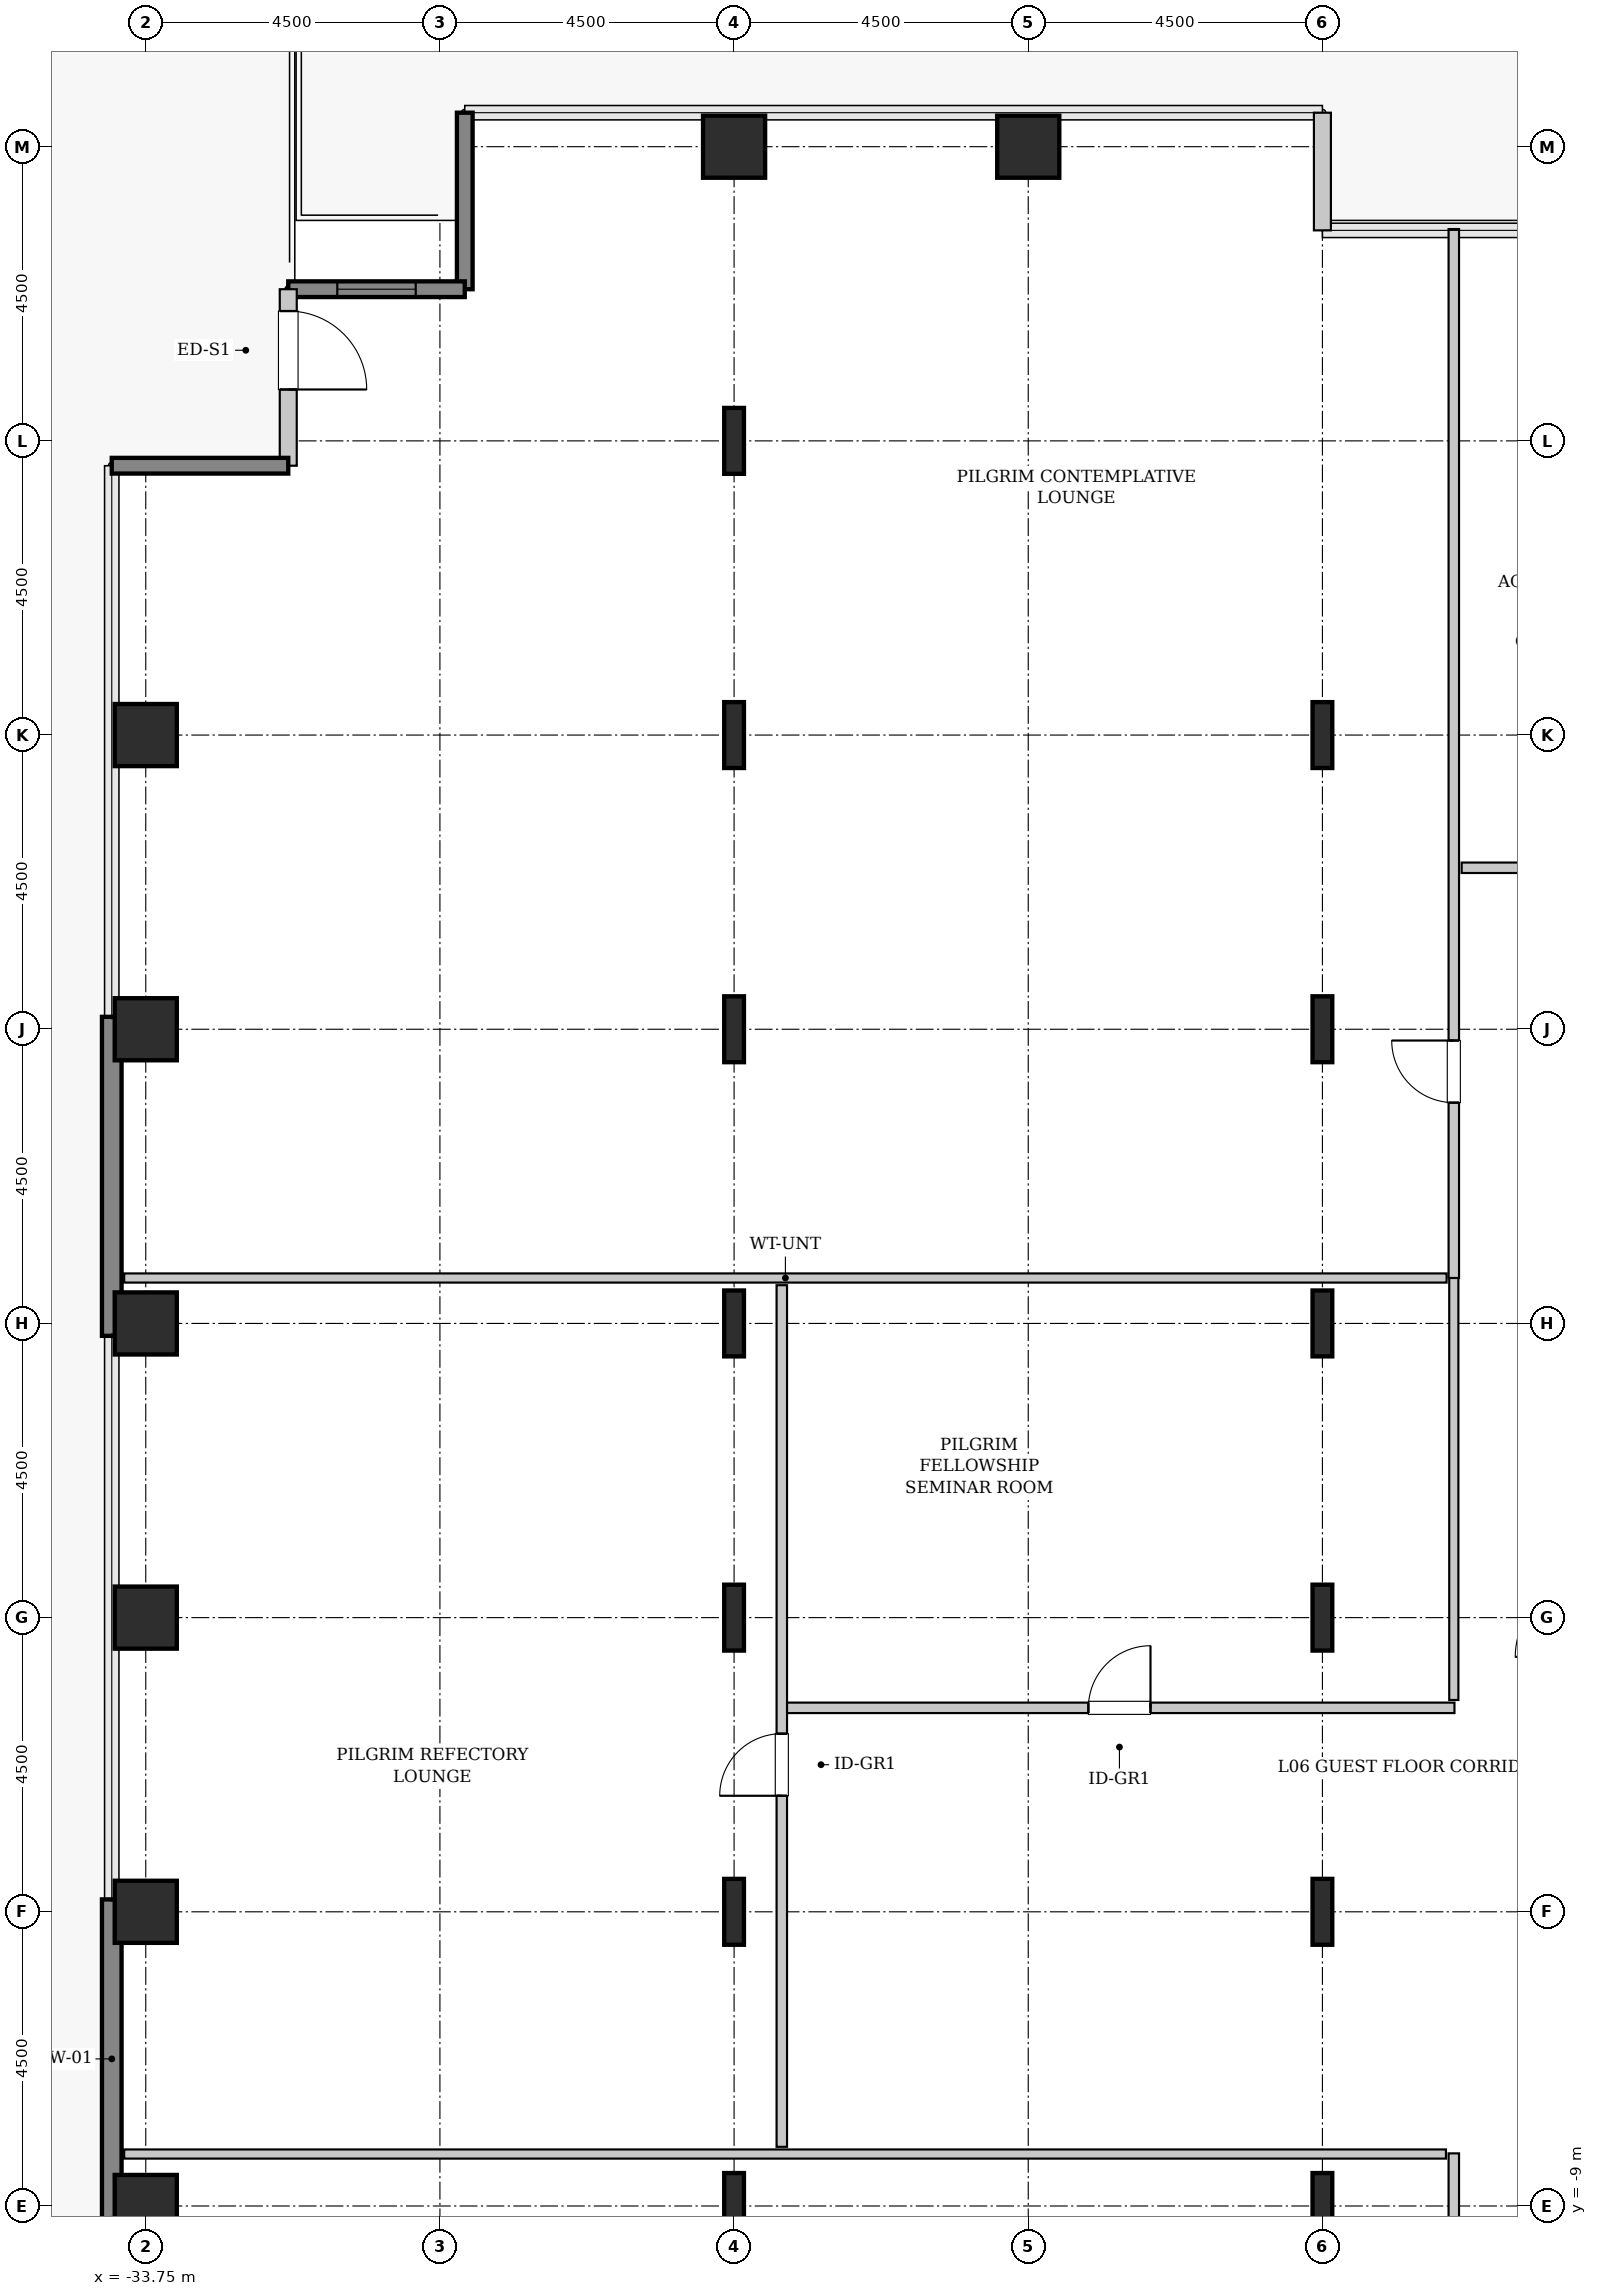
"""IFC4 building model, lengths in metres.
Left out: names, types, materials, properties, quantities, classifications, styles, units other than length and angle.
Written with IfcOpenShell. Run it as: python <this file> out.ifc"""

import sys

from ifc_helpers import new_model, si_unit, direction, frame, frame_2d, origin, origin_2d, place, context, subcontext, project, spatial, rectangle, hollow_rectangle, i_section, extrude, source, transform, mapped, element, fill, save


model = new_model("IFC4")
c1 = context("Model", 3, precision=1e-05, world=origin(), true_north=direction((0.0, 1.0)))
c2 = subcontext(c1, "Body", "Model", "MODEL_VIEW")
j1 = project(units=[si_unit("LENGTHUNIT", "METRE"), si_unit("PLANEANGLEUNIT", "RADIAN")], contexts=[c1])
p1 = place(None, origin())
s1 = spatial("IfcSite", under=j1, at=p1, CompositionType="ELEMENT")
p2 = place(p1, origin())
s2 = spatial("IfcBuilding", under=s1, at=p2, CompositionType="ELEMENT")
p3 = place(p2, frame((0.0, 0.0, 33.0)))
s3 = spatial("IfcBuildingStorey", under=s2, at=p3, CompositionType="ELEMENT", Elevation=33.0)
m1 = source(origin(), c2, "Body", "SweptSolid", [
    extrude(hollow_rectangle(XDim=0.95, YDim=0.95, WallThickness=0.045, InnerFilletRadius=0.045, OuterFilletRadius=0.09, at=origin_2d()), origin(), (0.0, 0.0, 1.0), 3.8),
])
for number, where, z_axis, x_axis in (
    (1, (-33.75, -9.0, 0.0), (0.0, 0.0, 1.0), (1.0, 0.0, 0.0)),
    (2, (-33.75, -4.5, 0.0), (0.0, 0.0, 1.0), (1.0, 0.0, 0.0)),
    (3, (-33.75, 0.0, 0.0), (0.0, 0.0, 1.0), (1.0, 0.0, 0.0)),
    (4, (-33.75, 4.5, 0.0), (0.0, 0.0, 1.0), (1.0, 0.0, 0.0)),
    (5, (-33.75, 9.0, 0.0), (0.0, 0.0, 1.0), (1.0, 0.0, 0.0)),
    (6, (-33.75, 13.5, 0.0), (0.0, 0.0, 1.0), (1.0, 0.0, 0.0)),
):
    element("IfcColumn", number, at=place(p3, frame(where, z_axis=z_axis, x_axis=x_axis)), inside=s3, PredefinedType="COLUMN", context=c2, shape_type="MappedRepresentation", body=[
        mapped(m1, transform((0.0, 0.0, 0.0), x_axis=(1.0, 0.0, 0.0), y_axis=(0.0, 1.0, 0.0), z_axis=(0.0, 0.0, 1.0), scale=1.0)),
    ])
m2 = source(origin(), c2, "Body", "SweptSolid", [
    extrude(i_section(OverallWidth=0.302, OverallDepth=1.008, WebThickness=0.021, FlangeThickness=0.04, FilletRadius=0.03, at=origin_2d()), origin(), (0.0, 0.0, 1.0), 3.8),
])
for number, where, z_axis, x_axis in (
    (7, (-24.75, -9.0, 0.0), (0.0, 0.0, 1.0), (1.0, 0.0, 0.0)),
    (8, (-24.75, -4.5, 0.0), (0.0, 0.0, 1.0), (1.0, 0.0, 0.0)),
    (9, (-24.75, 0.0, 0.0), (0.0, 0.0, 1.0), (1.0, 0.0, 0.0)),
    (10, (-24.75, 4.5, 0.0), (0.0, 0.0, 1.0), (1.0, 0.0, 0.0)),
    (11, (-24.75, 9.0, 0.0), (0.0, 0.0, 1.0), (1.0, 0.0, 0.0)),
    (12, (-24.75, 13.5, 0.0), (0.0, 0.0, 1.0), (1.0, 0.0, 0.0)),
    (13, (-24.75, 18.0, 0.0), (0.0, 0.0, 1.0), (1.0, 0.0, 0.0)),
):
    element("IfcColumn", number, at=place(p3, frame(where, z_axis=z_axis, x_axis=x_axis)), inside=s3, PredefinedType="COLUMN", context=c2, shape_type="MappedRepresentation", body=[
        mapped(m2, transform((0.0, 0.0, 0.0), x_axis=(1.0, 0.0, 0.0), y_axis=(0.0, 1.0, 0.0), z_axis=(0.0, 0.0, 1.0), scale=1.0)),
    ])
for number, where, z_axis, x_axis in (
    (14, (-24.75, 22.5, 0.0), (0.0, 0.0, 1.0), (1.0, 0.0, 0.0)),
    (15, (-20.25, 22.5, 0.0), (0.0, 0.0, 1.0), (1.0, 0.0, 0.0)),
):
    element("IfcColumn", number, at=place(p3, frame(where, z_axis=z_axis, x_axis=x_axis)), inside=s3, PredefinedType="COLUMN", context=c2, shape_type="MappedRepresentation", body=[
        mapped(m1, transform((0.0, 0.0, 0.0), x_axis=(1.0, 0.0, 0.0), y_axis=(0.0, 1.0, 0.0), z_axis=(0.0, 0.0, 1.0), scale=1.0)),
    ])
for number, where, z_axis, x_axis in (
    (16, (-15.75, -9.0, 0.0), (0.0, 0.0, 1.0), (1.0, 0.0, 0.0)),
    (17, (-15.75, -4.5, 0.0), (0.0, 0.0, 1.0), (1.0, 0.0, 0.0)),
    (18, (-15.75, 0.0, 0.0), (0.0, 0.0, 1.0), (1.0, 0.0, 0.0)),
    (19, (-15.75, 4.5, 0.0), (0.0, 0.0, 1.0), (1.0, 0.0, 0.0)),
    (20, (-15.75, 9.0, 0.0), (0.0, 0.0, 1.0), (1.0, 0.0, 0.0)),
    (21, (-15.75, 13.5, 0.0), (0.0, 0.0, 1.0), (1.0, 0.0, 0.0)),
):
    element("IfcColumn", number, at=place(p3, frame(where, z_axis=z_axis, x_axis=x_axis)), inside=s3, PredefinedType="COLUMN", context=c2, shape_type="MappedRepresentation", body=[
        mapped(m2, transform((0.0, 0.0, 0.0), x_axis=(1.0, 0.0, 0.0), y_axis=(0.0, 1.0, 0.0), z_axis=(0.0, 0.0, 1.0), scale=1.0)),
    ])
m3 = source(origin(), c2, "Body", "SweptSolid", [
    extrude(rectangle(XDim=4.88, YDim=0.3, at=frame_2d((2.44, 0.0))), origin(), (0.0, 0.0, 1.0), 3.55),
])
for number, where, z_axis, x_axis in (
    (22, (-34.27, -9.19, 0.0), (0.0, 0.0, 1.0), (0.0, 1.0, 0.0)),
    (23, (-34.27, 4.31, 0.0), (0.0, 0.0, 1.0), (0.0, 1.0, 0.0)),
):
    element("IfcWall", number, at=place(p3, frame(where, z_axis=z_axis, x_axis=x_axis)), inside=s3, PredefinedType="SHEAR", context=c2, shape_type="MappedRepresentation", body=[
        mapped(m3, transform((0.0, 0.0, 0.0), x_axis=(1.0, 0.0, 0.0), y_axis=(0.0, 1.0, 0.0), z_axis=(0.0, 0.0, 1.0), scale=1.0)),
    ])
m4 = source(origin(), c2, "Body", "SweptSolid", [
    extrude(rectangle(XDim=1.8, YDim=0.26, at=frame_2d((0.9, 0.0))), origin(), (0.0, 0.0, 1.0), 3.55),
])
p4 = place(p3, frame((-15.75, 21.22, 0.0), z_axis=(0.0, 0.0, 1.0), x_axis=(0.0, 1.0, 0.0)))
e24 = element("IfcWall", 24, at=p4, inside=s3, PredefinedType="SOLIDWALL", context=c2, shape_type="MappedRepresentation", body=[
    mapped(m4, transform((0.0, 0.0, 0.0), x_axis=(1.0, 0.0, 0.0), y_axis=(0.0, 1.0, 0.0), z_axis=(0.0, 0.0, 1.0), scale=1.0)),
])
m5 = source(origin(), c2, "Body", "SweptSolid", [
    extrude(rectangle(XDim=2.7, YDim=0.24, at=frame_2d((1.35, 0.0))), origin(), (0.0, 0.0, 1.0), 3.55),
])
p5 = place(p3, frame((-28.87, 23.02, 0.0), z_axis=(0.0, 0.0, 1.0), x_axis=(0.0, -1.0, 0.0)))
e25 = element("IfcWall", 25, at=p5, inside=s3, PredefinedType="SHEAR", context=c2, shape_type="MappedRepresentation", body=[
    mapped(m5, transform((0.0, 0.0, 0.0), x_axis=(1.0, 0.0, 0.0), y_axis=(0.0, 1.0, 0.0), z_axis=(0.0, 0.0, 1.0), scale=1.0)),
])
p6 = place(p3, frame((-28.87, 20.32, 0.0), z_axis=(0.0, 0.0, 1.0), x_axis=(-1.0, 0.0, 0.0)))
e26 = element("IfcWall", 26, at=p6, inside=s3, PredefinedType="SHEAR", context=c2, shape_type="MappedRepresentation", body=[
    mapped(m5, transform((0.0, 0.0, 0.0), x_axis=(1.0, 0.0, 0.0), y_axis=(0.0, 1.0, 0.0), z_axis=(0.0, 0.0, 1.0), scale=1.0)),
])
p7 = place(p6, frame((0.75, 0.0, 0.85)))
e27 = element("IfcOpeningElement", 27, at=p7, cuts=e26, PredefinedType="OPENING", context=c2, shape_type="SweptSolid", body=[
    extrude(rectangle(XDim=1.2, YDim=1.8, at=frame_2d((0.6, 0.9))), frame((0.0, 0.13, 0.0), z_axis=(0.0, -1.0, 0.0), x_axis=(1.0, 0.0, 0.0)), (0.0, 0.0, 1.0), 0.26),
])
m6 = source(origin(), c2, "Body", "SweptSolid", [
    extrude(rectangle(XDim=2.7, YDim=0.26, at=frame_2d((1.35, 0.0))), origin(), (0.0, 0.0, 1.0), 3.55),
])
p8 = place(p3, frame((-31.57, 20.32, 0.0), z_axis=(0.0, 0.0, 1.0), x_axis=(0.0, -1.0, 0.0)))
e28 = element("IfcWall", 28, at=p8, inside=s3, PredefinedType="SOLIDWALL", context=c2, shape_type="MappedRepresentation", body=[
    mapped(m6, transform((0.0, 0.0, 0.0), x_axis=(1.0, 0.0, 0.0), y_axis=(0.0, 1.0, 0.0), z_axis=(0.0, 0.0, 1.0), scale=1.0)),
])
p9 = place(p8, frame((0.334, 0.0, 0.0)))
e29 = element("IfcOpeningElement", 29, at=p9, cuts=e28, PredefinedType="OPENING", context=c2, shape_type="SweptSolid", body=[
    extrude(rectangle(XDim=1.2, YDim=2.2, at=frame_2d((0.6, 1.1))), frame((0.0, 0.14, 0.0), z_axis=(0.0, -1.0, 0.0), x_axis=(1.0, 0.0, 0.0)), (0.0, 0.0, 1.0), 0.28),
])
p10 = place(p3, frame((-31.57, 17.62, 0.0), z_axis=(0.0, 0.0, 1.0), x_axis=(-1.0, 0.0, 0.0)))
e30 = element("IfcWall", 30, at=p10, inside=s3, PredefinedType="SHEAR", context=c2, shape_type="MappedRepresentation", body=[
    mapped(m5, transform((0.0, 0.0, 0.0), x_axis=(1.0, 0.0, 0.0), y_axis=(0.0, 1.0, 0.0), z_axis=(0.0, 0.0, 1.0), scale=1.0)),
])
m7 = source(origin(), c2, "Body", "SweptSolid", [
    extrude(rectangle(XDim=13.045, YDim=0.16, at=frame_2d((6.522, 0.0))), origin(), (0.0, 0.0, 1.0), 3.535),
])
p11 = place(p3, frame((-13.74, -21.24, 0.0), z_axis=(0.0, 0.0, 1.0), x_axis=(0.0, 1.0, 0.0)))
e31 = element("IfcWall", 31, at=p11, inside=s3, PredefinedType="PARTITIONING", context=c2, shape_type="MappedRepresentation", body=[
    mapped(m7, transform((0.0, 0.0, 0.0), x_axis=(1.0, 0.0, 0.0), y_axis=(0.0, 1.0, 0.0), z_axis=(0.0, 0.0, 1.0), scale=1.0)),
])
p12 = place(p11, frame((10.913, 0.0, 0.0)))
e32 = element("IfcOpeningElement", 32, at=p12, cuts=e31, PredefinedType="OPENING", context=c2, shape_type="SweptSolid", body=[
    extrude(rectangle(XDim=0.95, YDim=2.1, at=frame_2d((0.475, 1.05))), frame((0.0, 0.09, 0.0), z_axis=(0.0, -1.0, 0.0), x_axis=(1.0, 0.0, 0.0)), (0.0, 0.0, 1.0), 0.18),
])
m8 = source(origin(), c2, "Body", "SweptSolid", [
    extrude(rectangle(XDim=20.22, YDim=0.14, at=frame_2d((10.11, 0.0))), origin(), (0.0, 0.0, 1.0), 3.535),
])
p13 = place(p3, frame((-34.08, -8.205, 0.0), z_axis=(0.0, 0.0, 1.0), x_axis=(1.0, 0.0, 0.0)))
e33 = element("IfcWall", 33, at=p13, inside=s3, PredefinedType="PARTITIONING", context=c2, shape_type="MappedRepresentation", body=[
    mapped(m8, transform((0.0, 0.0, 0.0), x_axis=(1.0, 0.0, 0.0), y_axis=(0.0, 1.0, 0.0), z_axis=(0.0, 0.0, 1.0), scale=1.0)),
])
m9 = source(origin(), c2, "Body", "SweptSolid", [
    extrude(rectangle(XDim=10.25, YDim=0.16, at=frame_2d((5.125, 0.0))), origin(), (0.0, 0.0, 1.0), 3.535),
])
p14 = place(p3, frame((-23.98, -1.38, 0.0), z_axis=(0.0, 0.0, 1.0), x_axis=(1.0, 0.0, 0.0)))
e34 = element("IfcWall", 34, at=p14, inside=s3, PredefinedType="PARTITIONING", context=c2, shape_type="MappedRepresentation", body=[
    mapped(m9, transform((0.0, 0.0, 0.0), x_axis=(1.0, 0.0, 0.0), y_axis=(0.0, 1.0, 0.0), z_axis=(0.0, 0.0, 1.0), scale=1.0)),
])
p15 = place(p14, frame((4.65, 0.0, 0.0)))
e35 = element("IfcOpeningElement", 35, at=p15, cuts=e34, PredefinedType="OPENING", context=c2, shape_type="SweptSolid", body=[
    extrude(rectangle(XDim=0.95, YDim=2.1, at=frame_2d((0.475, 1.05))), frame((0.0, 0.09, 0.0), z_axis=(0.0, -1.0, 0.0), x_axis=(1.0, 0.0, 0.0)), (0.0, 0.0, 1.0), 0.18),
])
m10 = source(origin(), c2, "Body", "SweptSolid", [
    extrude(rectangle(XDim=6.465, YDim=0.14, at=frame_2d((3.232, 0.0))), origin(), (0.0, 0.0, 1.0), 3.535),
])
p16 = place(p3, frame((-13.74, -1.26, 0.0), z_axis=(0.0, 0.0, 1.0), x_axis=(0.0, 1.0, 0.0)))
e36 = element("IfcWall", 36, at=p16, inside=s3, PredefinedType="PARTITIONING", context=c2, shape_type="MappedRepresentation", body=[
    mapped(m10, transform((0.0, 0.0, 0.0), x_axis=(1.0, 0.0, 0.0), y_axis=(0.0, 1.0, 0.0), z_axis=(0.0, 0.0, 1.0), scale=1.0)),
])
m11 = source(origin(), c2, "Body", "SweptSolid", [
    extrude(rectangle(XDim=20.23, YDim=0.14, at=frame_2d((10.115, 0.0))), origin(), (0.0, 0.0, 1.0), 3.535),
])
p17 = place(p3, frame((-34.08, 5.195, 0.0), z_axis=(0.0, 0.0, 1.0), x_axis=(1.0, 0.0, 0.0)))
e37 = element("IfcWall", 37, at=p17, inside=s3, PredefinedType="PARTITIONING", context=c2, shape_type="MappedRepresentation", body=[
    mapped(m11, transform((0.0, 0.0, 0.0), x_axis=(1.0, 0.0, 0.0), y_axis=(0.0, 1.0, 0.0), z_axis=(0.0, 0.0, 1.0), scale=1.0)),
])
m12 = source(origin(), c2, "Body", "SweptSolid", [
    extrude(rectangle(XDim=13.18, YDim=0.16, at=frame_2d((6.59, 0.0))), origin(), (0.0, 0.0, 1.0), 3.535),
])
p18 = place(p3, frame((-24.02, -8.095, 0.0), z_axis=(0.0, 0.0, 1.0), x_axis=(0.0, 1.0, 0.0)))
e38 = element("IfcWall", 38, at=p18, inside=s3, PredefinedType="PARTITIONING", context=c2, shape_type="MappedRepresentation", body=[
    mapped(m12, transform((0.0, 0.0, 0.0), x_axis=(1.0, 0.0, 0.0), y_axis=(0.0, 1.0, 0.0), z_axis=(0.0, 0.0, 1.0), scale=1.0)),
])
p19 = place(p18, frame((5.37, 0.0, 0.0)))
e39 = element("IfcOpeningElement", 39, at=p19, cuts=e38, PredefinedType="OPENING", context=c2, shape_type="SweptSolid", body=[
    extrude(rectangle(XDim=0.95, YDim=2.1, at=frame_2d((0.475, 1.05))), frame((0.0, 0.09, 0.0), z_axis=(0.0, -1.0, 0.0), x_axis=(1.0, 0.0, 0.0)), (0.0, 0.0, 1.0), 0.18),
])
m13 = source(origin(), c2, "Body", "SweptSolid", [
    extrude(rectangle(XDim=16.045, YDim=0.16, at=frame_2d((8.022, 0.0))), origin(), (0.0, 0.0, 1.0), 3.535),
])
p20 = place(p3, frame((-13.74, 5.195, 0.0), z_axis=(0.0, 0.0, 1.0), x_axis=(0.0, 1.0, 0.0)))
e40 = element("IfcWall", 40, at=p20, inside=s3, PredefinedType="PARTITIONING", context=c2, shape_type="MappedRepresentation", body=[
    mapped(m13, transform((0.0, 0.0, 0.0), x_axis=(1.0, 0.0, 0.0), y_axis=(0.0, 1.0, 0.0), z_axis=(0.0, 0.0, 1.0), scale=1.0)),
])
p21 = place(p20, frame((2.683, 0.0, 0.0)))
e41 = element("IfcOpeningElement", 41, at=p21, cuts=e40, PredefinedType="OPENING", context=c2, shape_type="SweptSolid", body=[
    extrude(rectangle(XDim=0.95, YDim=2.1, at=frame_2d((0.475, 1.05))), frame((0.0, 0.09, 0.0), z_axis=(0.0, -1.0, 0.0), x_axis=(1.0, 0.0, 0.0)), (0.0, 0.0, 1.0), 0.18),
])
m14 = source(origin(), c2, "Body", "SweptSolid", [
    extrude(rectangle(XDim=4.125, YDim=0.16, at=frame_2d((2.062, 0.0))), origin(), (0.0, 0.0, 1.0), 3.535),
])
p22 = place(p3, frame((-13.62, 11.47, 0.0), z_axis=(0.0, 0.0, 1.0), x_axis=(1.0, 0.0, 0.0)))
e42 = element("IfcWall", 42, at=p22, inside=s3, PredefinedType="PARTITIONING", context=c2, shape_type="MappedRepresentation", body=[
    mapped(m14, transform((0.0, 0.0, 0.0), x_axis=(1.0, 0.0, 0.0), y_axis=(0.0, 1.0, 0.0), z_axis=(0.0, 0.0, 1.0), scale=1.0)),
])
p23 = place(p22, frame((1.587, 0.0, 0.0)))
e43 = element("IfcOpeningElement", 43, at=p23, cuts=e42, PredefinedType="OPENING", context=c2, shape_type="SweptSolid", body=[
    extrude(rectangle(XDim=0.95, YDim=2.1, at=frame_2d((0.475, 1.05))), frame((0.0, 0.09, 0.0), z_axis=(0.0, -1.0, 0.0), x_axis=(1.0, 0.0, 0.0)), (0.0, 0.0, 1.0), 0.18),
])
m15 = source(origin(), c2, "Body", "SweptSolid", [
    extrude(rectangle(XDim=1.2, YDim=1.8, at=frame_2d((0.6, 0.9))), frame((0.0, 0.03, 0.0), z_axis=(0.0, -1.0, 0.0), x_axis=(1.0, 0.0, 0.0)), (0.0, 0.0, 1.0), 0.06),
])
p24 = place(p7, origin())
e44 = element("IfcWindow", 44, at=p24, inside=s3, PartitioningType="SINGLE_PANEL", PredefinedType="WINDOW", context=c2, shape_type="MappedRepresentation", body=[
    mapped(m15, transform((0.0, 0.0, 0.0), x_axis=(1.0, 0.0, 0.0), y_axis=(0.0, 1.0, 0.0), z_axis=(0.0, 0.0, 1.0), scale=1.0)),
])
fill(e27, e44)
m16 = source(origin(), c2, "Body", "SweptSolid", [
    extrude(rectangle(XDim=1.2, YDim=2.2, at=frame_2d((0.6, 1.1))), frame((0.0, 0.025, 0.0), z_axis=(0.0, -1.0, 0.0), x_axis=(1.0, 0.0, 0.0)), (0.0, 0.0, 1.0), 0.05),
])
p25 = place(p9, origin())
e45 = element("IfcDoor", 45, at=p25, inside=s3, OperationType="SINGLE_SWING_RIGHT", PredefinedType="DOOR", context=c2, shape_type="MappedRepresentation", body=[
    mapped(m16, transform((0.0, 0.0, 0.0), x_axis=(1.0, 0.0, 0.0), y_axis=(0.0, 1.0, 0.0), z_axis=(0.0, 0.0, 1.0), scale=1.0)),
])
fill(e29, e45)
m17 = source(origin(), c2, "Body", "SweptSolid", [
    extrude(rectangle(XDim=0.95, YDim=2.1, at=frame_2d((0.475, 1.05))), frame((0.0, 0.025, 0.0), z_axis=(0.0, -1.0, 0.0), x_axis=(1.0, 0.0, 0.0)), (0.0, 0.0, 1.0), 0.05),
])
p26 = place(p15, origin())
e46 = element("IfcDoor", 46, at=p26, inside=s3, OperationType="SINGLE_SWING_RIGHT", PredefinedType="DOOR", context=c2, shape_type="MappedRepresentation", body=[
    mapped(m17, transform((0.0, 0.0, 0.0), x_axis=(1.0, 0.0, 0.0), y_axis=(0.0, 1.0, 0.0), z_axis=(0.0, 0.0, 1.0), scale=1.0)),
])
fill(e35, e46)
p27 = place(p19, origin())
e47 = element("IfcDoor", 47, at=p27, inside=s3, OperationType="SINGLE_SWING_LEFT", PredefinedType="DOOR", context=c2, shape_type="MappedRepresentation", body=[
    mapped(m17, transform((0.0, 0.0, 0.0), x_axis=(1.0, 0.0, 0.0), y_axis=(0.0, 1.0, 0.0), z_axis=(0.0, 0.0, 1.0), scale=1.0)),
])
fill(e39, e47)
p28 = place(p21, origin())
e48 = element("IfcDoor", 48, at=p28, inside=s3, OperationType="SINGLE_SWING_RIGHT", PredefinedType="DOOR", context=c2, shape_type="MappedRepresentation", body=[
    mapped(m17, transform((0.0, 0.0, 0.0), x_axis=(1.0, 0.0, 0.0), y_axis=(0.0, 1.0, 0.0), z_axis=(0.0, 0.0, 1.0), scale=1.0)),
])
fill(e41, e48)
save(model, sys.argv[1])
